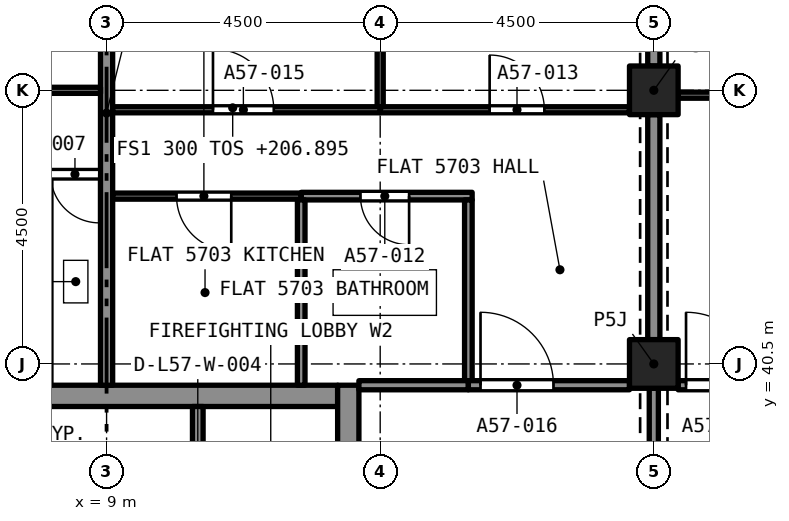
"""IFC4 building model, lengths in metres.
Left out: names, types, materials, properties, quantities, classifications, styles, units other than length and angle.
Written with IfcOpenShell. Run it as: python <this file> out.ifc"""

import sys

from ifc_helpers import new_model, si_unit, direction, frame, frame_2d, origin, origin_2d, place, context, subcontext, project, spatial, rectangle, extrude, element, fill, save


model = new_model("IFC4")
c1 = context("Model", 3, precision=1e-05, world=origin(), true_north=direction((0.0, 1.0)))
c2 = subcontext(c1, "Body", "Model", "MODEL_VIEW")
j1 = project(units=[si_unit("LENGTHUNIT", "METRE"), si_unit("PLANEANGLEUNIT", "RADIAN")], contexts=[c1])
p1 = place(None, origin())
s1 = spatial("IfcSite", under=j1, at=p1, CompositionType="ELEMENT")
p2 = place(p1, origin())
s2 = spatial("IfcBuilding", under=s1, at=p2, CompositionType="ELEMENT")
p3 = place(p2, frame((0.0, 0.0, 206.895)))
s3 = spatial("IfcBuildingStorey", under=s2, at=p3, CompositionType="ELEMENT", Elevation=206.895)
for number, where, z_axis, x_axis in (
    (1, (18.0, 40.5, 0.0), (0.0, 0.0, 1.0), (1.0, 0.0, 0.0)),
    (2, (18.0, 45.0, 0.0), (0.0, 0.0, 1.0), (1.0, 0.0, 0.0)),
):
    element("IfcColumn", number, at=place(p3, frame(where, z_axis=z_axis, x_axis=x_axis)), inside=s3, PredefinedType="COLUMN", context=c2, shape_type="SweptSolid", body=[
        extrude(rectangle(XDim=0.8, YDim=0.8, at=origin_2d()), origin(), (0.0, 0.0, 1.0), 3.2),
    ])
p4 = place(p3, frame((5.2, 39.975, 0.0), z_axis=(0.0, 0.0, 1.0), x_axis=(1.0, 0.0, 0.0)))
e3 = element("IfcWall", 3, at=p4, inside=s3, PredefinedType="SOLIDWALL", context=c2, shape_type="SweptSolid", body=[
    extrude(rectangle(XDim=7.6, YDim=0.35, at=frame_2d((3.8, 0.0))), origin(), (0.0, 0.0, 1.0), 3.2),
])
p5 = place(p3, frame((12.975, 27.35, 0.0), z_axis=(0.0, 0.0, 1.0), x_axis=(0.0, 1.0, 0.0)))
e4 = element("IfcWall", 4, at=p5, inside=s3, PredefinedType="SOLIDWALL", context=c2, shape_type="SweptSolid", body=[
    extrude(rectangle(XDim=12.8, YDim=0.35, at=frame_2d((6.4, 0.0))), origin(), (0.0, 0.0, 1.0), 3.2),
])
p6 = place(p5, frame((10.75, 0.0, 0.0)))
e5 = element("IfcOpeningElement", 5, at=p6, cuts=e4, PredefinedType="OPENING", context=c2, shape_type="SweptSolid", body=[
    extrude(rectangle(XDim=1.1, YDim=2.1, at=frame_2d((0.55, 1.05))), frame((0.0, 0.185, 0.0), z_axis=(0.0, -1.0, 0.0), x_axis=(1.0, 0.0, 0.0)), (0.0, 0.0, 1.0), 0.37),
])
p7 = place(p5, frame((8.6, 0.0, 0.0)))
e6 = element("IfcOpeningElement", 6, at=p7, cuts=e4, PredefinedType="OPENING", context=c2, shape_type="SweptSolid", body=[
    extrude(rectangle(XDim=1.2, YDim=2.1, at=frame_2d((0.6, 1.05))), frame((0.0, 0.185, 0.0), z_axis=(0.0, -1.0, 0.0), x_axis=(1.0, 0.0, 0.0)), (0.0, 0.0, 1.0), 0.37),
])
p8 = place(p3, frame((8.9, 43.62, 0.0), z_axis=(0.0, 0.0, 1.0), x_axis=(-1.0, 0.0, 0.0)))
e7 = element("IfcWall", 7, at=p8, inside=s3, PredefinedType="PARTITIONING", context=c2, shape_type="SweptSolid", body=[
    extrude(rectangle(XDim=0.877, YDim=0.125, at=frame_2d((0.438, 0.0))), origin(), (0.0, 0.0, 1.0), 2.9),
])
p9 = place(p8, frame((0.02, 0.0, 0.0)))
e8 = element("IfcOpeningElement", 8, at=p9, cuts=e7, PredefinedType="OPENING", context=c2, shape_type="SweptSolid", body=[
    extrude(rectangle(XDim=0.8, YDim=2.1, at=frame_2d((0.4, 1.05))), frame((0.0, 0.073, 0.0), z_axis=(0.0, -1.0, 0.0), x_axis=(1.0, 0.0, 0.0)), (0.0, 0.0, 1.0), 0.145),
])
p10 = place(p3, frame((9.0, 40.15, 0.0), z_axis=(0.0, 0.0, 1.0), x_axis=(0.0, 1.0, 0.0)))
e9 = element("IfcWall", 9, at=p10, inside=s3, PredefinedType="PARTITIONING", context=c2, shape_type="SweptSolid", body=[
    extrude(rectangle(XDim=8.95, YDim=0.2, at=frame_2d((4.475, 0.0))), origin(), (0.0, 0.0, 1.0), 2.9),
])
p11 = place(p3, frame((4.5, 45.0, 0.0), z_axis=(0.0, 0.0, 1.0), x_axis=(1.0, 0.0, 0.0)))
e10 = element("IfcWall", 10, at=p11, inside=s3, PredefinedType="PARTITIONING", context=c2, shape_type="SweptSolid", body=[
    extrude(rectangle(XDim=4.4, YDim=0.1, at=frame_2d((2.2, 0.0))), origin(), (0.0, 0.0, 1.0), 2.9),
])
p12 = place(p11, frame((1.8, 0.0, 0.0)))
e11 = element("IfcOpeningElement", 11, at=p12, cuts=e10, PredefinedType="OPENING", context=c2, shape_type="SweptSolid", body=[
    extrude(rectangle(XDim=0.9, YDim=2.1, at=frame_2d((0.45, 1.05))), frame((0.0, 0.06, 0.0), z_axis=(0.0, -1.0, 0.0), x_axis=(1.0, 0.0, 0.0)), (0.0, 0.0, 1.0), 0.12),
])
p13 = place(p3, frame((15.012, 43.26, 0.0), z_axis=(0.0, 0.0, 1.0), x_axis=(-1.0, 0.0, 0.0)))
e12 = element("IfcWall", 12, at=p13, inside=s3, PredefinedType="PARTITIONING", context=c2, shape_type="SweptSolid", body=[
    extrude(rectangle(XDim=2.812, YDim=0.125, at=frame_2d((1.406, 0.0))), origin(), (0.0, 0.0, 1.0), 2.9),
])
p14 = place(p13, frame((1.037, 0.0, 0.0)))
e13 = element("IfcOpeningElement", 13, at=p14, cuts=e12, PredefinedType="OPENING", context=c2, shape_type="SweptSolid", body=[
    extrude(rectangle(XDim=0.8, YDim=2.1, at=frame_2d((0.4, 1.05))), frame((0.0, 0.073, 0.0), z_axis=(0.0, -1.0, 0.0), x_axis=(1.0, 0.0, 0.0)), (0.0, 0.0, 1.0), 0.145),
])
p15 = place(p3, frame((14.95, 40.225, 0.0), z_axis=(0.0, 0.0, 1.0), x_axis=(0.0, 1.0, 0.0)))
e14 = element("IfcWall", 14, at=p15, inside=s3, PredefinedType="PARTITIONING", context=c2, shape_type="SweptSolid", body=[
    extrude(rectangle(XDim=2.972, YDim=0.125, at=frame_2d((1.486, 0.0))), origin(), (0.0, 0.0, 1.0), 2.9),
])
p16 = place(p3, frame((12.201, 40.15, 0.0), z_axis=(0.0, 0.0, 1.0), x_axis=(0.0, 1.0, 0.0)))
e15 = element("IfcWall", 15, at=p16, inside=s3, PredefinedType="PARTITIONING", context=c2, shape_type="SweptSolid", body=[
    extrude(rectangle(XDim=3.048, YDim=0.125, at=frame_2d((1.524, 0.0))), origin(), (0.0, 0.0, 1.0), 2.9),
])
p17 = place(p3, frame((13.15, 40.15, 0.0), z_axis=(0.0, 0.0, 1.0), x_axis=(1.0, 0.0, 0.0)))
e16 = element("IfcWall", 16, at=p17, inside=s3, PredefinedType="PARTITIONING", context=c2, shape_type="SweptSolid", body=[
    extrude(rectangle(XDim=1.8, YDim=0.15, at=frame_2d((0.9, 0.0))), origin(), (0.0, 0.0, 1.0), 2.9),
])
p18 = place(p3, frame((13.5, 44.68, 0.0), z_axis=(0.0, 0.0, 1.0), x_axis=(1.0, 0.0, 0.0)))
e17 = element("IfcWall", 17, at=p18, inside=s3, PredefinedType="PARTITIONING", context=c2, shape_type="SweptSolid", body=[
    extrude(rectangle(XDim=4.1, YDim=0.1, at=frame_2d((2.05, 0.0))), origin(), (0.0, 0.0, 1.0), 2.9),
])
p19 = place(p18, frame((1.8, 0.0, 0.0)))
e18 = element("IfcOpeningElement", 18, at=p19, cuts=e17, PredefinedType="OPENING", context=c2, shape_type="SweptSolid", body=[
    extrude(rectangle(XDim=0.9, YDim=2.1, at=frame_2d((0.45, 1.05))), frame((0.0, 0.06, 0.0), z_axis=(0.0, -1.0, 0.0), x_axis=(1.0, 0.0, 0.0)), (0.0, 0.0, 1.0), 0.12),
])
p20 = place(p3, frame((13.5, 44.73, 0.0), z_axis=(0.0, 0.0, 1.0), x_axis=(0.0, 1.0, 0.0)))
e19 = element("IfcWall", 19, at=p20, inside=s3, PredefinedType="PARTITIONING", context=c2, shape_type="SweptSolid", body=[
    extrude(rectangle(XDim=4.37, YDim=0.1, at=frame_2d((2.185, 0.0))), origin(), (0.0, 0.0, 1.0), 2.9),
])
p21 = place(p3, frame((18.0, 45.4, 0.0), z_axis=(0.0, 0.0, 1.0), x_axis=(0.0, 1.0, 0.0)))
e20 = element("IfcWall", 20, at=p21, inside=s3, PredefinedType="PARTITIONING", context=c2, shape_type="SweptSolid", body=[
    extrude(rectangle(XDim=3.7, YDim=0.2, at=frame_2d((1.85, 0.0))), origin(), (0.0, 0.0, 1.0), 2.38),
])
p22 = place(p3, frame((12.201, 43.26, 0.0), z_axis=(0.0, 0.0, 1.0), x_axis=(-1.0, 0.0, 0.0)))
e21 = element("IfcWall", 21, at=p22, inside=s3, PredefinedType="PARTITIONING", context=c2, shape_type="SweptSolid", body=[
    extrude(rectangle(XDim=3.101, YDim=0.1, at=frame_2d((1.55, 0.0))), origin(), (0.0, 0.0, 1.0), 2.9),
])
p23 = place(p22, frame((1.15, 0.0, 0.0)))
e22 = element("IfcOpeningElement", 22, at=p23, cuts=e21, PredefinedType="OPENING", context=c2, shape_type="SweptSolid", body=[
    extrude(rectangle(XDim=0.9, YDim=2.1, at=frame_2d((0.45, 1.05))), frame((0.0, 0.06, 0.0), z_axis=(0.0, -1.0, 0.0), x_axis=(1.0, 0.0, 0.0)), (0.0, 0.0, 1.0), 0.12),
])
p24 = place(p3, frame((9.1, 44.68, 0.0), z_axis=(0.0, 0.0, 1.0), x_axis=(1.0, 0.0, 0.0)))
e23 = element("IfcWall", 23, at=p24, inside=s3, PredefinedType="PARTITIONING", context=c2, shape_type="SweptSolid", body=[
    extrude(rectangle(XDim=4.4, YDim=0.1, at=frame_2d((2.2, 0.0))), origin(), (0.0, 0.0, 1.0), 2.9),
])
p25 = place(p24, frame((1.65, 0.0, 0.0)))
e24 = element("IfcOpeningElement", 24, at=p25, cuts=e23, PredefinedType="OPENING", context=c2, shape_type="SweptSolid", body=[
    extrude(rectangle(XDim=1.0, YDim=2.1, at=frame_2d((0.5, 1.05))), frame((0.0, 0.06, 0.0), z_axis=(0.0, -1.0, 0.0), x_axis=(1.0, 0.0, 0.0)), (0.0, 0.0, 1.0), 0.12),
])
p26 = place(p3, frame((18.0, 40.9, 0.0), z_axis=(0.0, 0.0, 1.0), x_axis=(0.0, 1.0, 0.0)))
e25 = element("IfcWall", 25, at=p26, inside=s3, PredefinedType="PARTITIONING", context=c2, shape_type="SweptSolid", body=[
    extrude(rectangle(XDim=3.7, YDim=0.2, at=frame_2d((1.85, 0.0))), origin(), (0.0, 0.0, 1.0), 2.38),
])
p27 = place(p3, frame((14.95, 40.15, 0.0), z_axis=(0.0, 0.0, 1.0), x_axis=(1.0, 0.0, 0.0)))
e26 = element("IfcWall", 26, at=p27, inside=s3, PredefinedType="PARTITIONING", context=c2, shape_type="SweptSolid", body=[
    extrude(rectangle(XDim=2.65, YDim=0.15, at=frame_2d((1.325, 0.0))), origin(), (0.0, 0.0, 1.0), 2.9),
])
p28 = place(p27, frame((0.2, 0.0, 0.0)))
e27 = element("IfcOpeningElement", 27, at=p28, cuts=e26, PredefinedType="OPENING", context=c2, shape_type="SweptSolid", body=[
    extrude(rectangle(XDim=1.2, YDim=2.4, at=frame_2d((0.6, 1.2))), frame((0.0, 0.085, 0.0), z_axis=(0.0, -1.0, 0.0), x_axis=(1.0, 0.0, 0.0)), (0.0, 0.0, 1.0), 0.17),
])
p29 = place(p3, frame((18.4, 44.92, 0.0), z_axis=(0.0, 0.0, 1.0), x_axis=(1.0, 0.0, 0.0)))
e28 = element("IfcWall", 28, at=p29, inside=s3, PredefinedType="PARTITIONING", context=c2, shape_type="SweptSolid", body=[
    extrude(rectangle(XDim=4.1, YDim=0.1, at=frame_2d((2.05, 0.0))), origin(), (0.0, 0.0, 1.0), 2.75),
])
p30 = place(p29, frame((1.4, 0.0, 0.0)))
e29 = element("IfcOpeningElement", 29, at=p30, cuts=e28, PredefinedType="OPENING", context=c2, shape_type="SweptSolid", body=[
    extrude(rectangle(XDim=0.9, YDim=2.1, at=frame_2d((0.45, 1.05))), frame((0.0, 0.06, 0.0), z_axis=(0.0, -1.0, 0.0), x_axis=(1.0, 0.0, 0.0)), (0.0, 0.0, 1.0), 0.12),
])
p31 = place(p3, frame((18.4, 40.15, 0.0), z_axis=(0.0, 0.0, 1.0), x_axis=(1.0, 0.0, 0.0)))
e30 = element("IfcWall", 30, at=p31, inside=s3, PredefinedType="PARTITIONING", context=c2, shape_type="SweptSolid", body=[
    extrude(rectangle(XDim=1.95, YDim=0.15, at=frame_2d((0.975, 0.0))), origin(), (0.0, 0.0, 1.0), 2.75),
])
p32 = place(p31, frame((0.13, 0.0, 0.0)))
e31 = element("IfcOpeningElement", 31, at=p32, cuts=e30, PredefinedType="OPENING", context=c2, shape_type="SweptSolid", body=[
    extrude(rectangle(XDim=1.2, YDim=2.4, at=frame_2d((0.6, 1.2))), frame((0.0, 0.085, 0.0), z_axis=(0.0, -1.0, 0.0), x_axis=(1.0, 0.0, 0.0)), (0.0, 0.0, 1.0), 0.17),
])
p33 = place(p3, frame((18.0, 40.1, 0.0), z_axis=(0.0, 0.0, 1.0), x_axis=(0.0, -1.0, 0.0)))
e32 = element("IfcWall", 32, at=p33, inside=s3, PredefinedType="PARTITIONING", context=c2, shape_type="SweptSolid", body=[
    extrude(rectangle(XDim=3.7, YDim=0.15, at=frame_2d((1.85, 0.0))), origin(), (0.0, 0.0, 1.0), 2.38),
])
p34 = place(p33, frame((1.25, 0.0, 0.0)))
e33 = element("IfcOpeningElement", 33, at=p34, cuts=e32, PredefinedType="OPENING", context=c2, shape_type="SweptSolid", body=[
    extrude(rectangle(XDim=1.2, YDim=2.1, at=frame_2d((0.6, 1.05))), frame((0.0, 0.085, 0.0), z_axis=(0.0, -1.0, 0.0), x_axis=(1.0, 0.0, 0.0)), (0.0, 0.0, 1.0), 0.17),
])
p35 = place(p3, frame((10.5, 37.5, 0.0), z_axis=(0.0, 0.0, 1.0), x_axis=(0.0, 1.0, 0.0)))
e34 = element("IfcWall", 34, at=p35, inside=s3, PredefinedType="SOLIDWALL", context=c2, shape_type="SweptSolid", body=[
    extrude(rectangle(XDim=2.3, YDim=0.175, at=frame_2d((1.15, 0.0))), origin(), (0.0, 0.0, 1.0), 2.9),
])
p36 = place(p35, frame((0.65, 0.0, 0.0)))
e35 = element("IfcOpeningElement", 35, at=p36, cuts=e34, PredefinedType="OPENING", context=c2, shape_type="SweptSolid", body=[
    extrude(rectangle(XDim=1.0, YDim=2.1, at=frame_2d((0.5, 1.05))), frame((0.0, 0.097, 0.0), z_axis=(0.0, -1.0, 0.0), x_axis=(1.0, 0.0, 0.0)), (0.0, 0.0, 1.0), 0.195),
])
p37 = place(p9, origin())
e36 = element("IfcDoor", 36, at=p37, inside=s3, OperationType="SINGLE_SWING_LEFT", PredefinedType="DOOR", context=c2, shape_type="SweptSolid", body=[
    extrude(rectangle(XDim=0.8, YDim=2.1, at=frame_2d((0.4, 1.05))), frame((0.0, 0.025, 0.0), z_axis=(0.0, -1.0, 0.0), x_axis=(1.0, 0.0, 0.0)), (0.0, 0.0, 1.0), 0.05),
])
fill(e8, e36)
p38 = place(p14, origin())
e37 = element("IfcDoor", 37, at=p38, inside=s3, OperationType="SINGLE_SWING_RIGHT", PredefinedType="DOOR", context=c2, shape_type="SweptSolid", body=[
    extrude(rectangle(XDim=0.8, YDim=2.1, at=frame_2d((0.4, 1.05))), frame((0.0, 0.025, 0.0), z_axis=(0.0, -1.0, 0.0), x_axis=(1.0, 0.0, 0.0)), (0.0, 0.0, 1.0), 0.05),
])
fill(e13, e37)
p39 = place(p19, origin())
e38 = element("IfcDoor", 38, at=p39, inside=s3, OperationType="SINGLE_SWING_RIGHT", PredefinedType="DOOR", context=c2, shape_type="SweptSolid", body=[
    extrude(rectangle(XDim=0.9, YDim=2.1, at=frame_2d((0.45, 1.05))), frame((0.0, 0.025, 0.0), z_axis=(0.0, -1.0, 0.0), x_axis=(1.0, 0.0, 0.0)), (0.0, 0.0, 1.0), 0.05),
])
fill(e18, e38)
p40 = place(p23, origin())
e39 = element("IfcDoor", 39, at=p40, inside=s3, OperationType="SINGLE_SWING_RIGHT", PredefinedType="DOOR", context=c2, shape_type="SweptSolid", body=[
    extrude(rectangle(XDim=0.9, YDim=2.1, at=frame_2d((0.45, 1.05))), frame((0.0, 0.025, 0.0), z_axis=(0.0, -1.0, 0.0), x_axis=(1.0, 0.0, 0.0)), (0.0, 0.0, 1.0), 0.05),
])
fill(e22, e39)
p41 = place(p25, origin())
e40 = element("IfcDoor", 40, at=p41, inside=s3, OperationType="SINGLE_SWING_LEFT", PredefinedType="DOOR", context=c2, shape_type="SweptSolid", body=[
    extrude(rectangle(XDim=1.0, YDim=2.1, at=frame_2d((0.5, 1.05))), frame((0.0, 0.025, 0.0), z_axis=(0.0, -1.0, 0.0), x_axis=(1.0, 0.0, 0.0)), (0.0, 0.0, 1.0), 0.05),
])
fill(e24, e40)
p42 = place(p28, origin())
e41 = element("IfcDoor", 41, at=p42, inside=s3, OperationType="SINGLE_SWING_LEFT", PredefinedType="DOOR", context=c2, shape_type="SweptSolid", body=[
    extrude(rectangle(XDim=1.2, YDim=2.4, at=frame_2d((0.6, 1.2))), frame((0.0, 0.025, 0.0), z_axis=(0.0, -1.0, 0.0), x_axis=(1.0, 0.0, 0.0)), (0.0, 0.0, 1.0), 0.05),
])
fill(e27, e41)
p43 = place(p32, origin())
e42 = element("IfcDoor", 42, at=p43, inside=s3, OperationType="SINGLE_SWING_LEFT", PredefinedType="DOOR", context=c2, shape_type="SweptSolid", body=[
    extrude(rectangle(XDim=1.2, YDim=2.4, at=frame_2d((0.6, 1.2))), frame((0.0, 0.025, 0.0), z_axis=(0.0, -1.0, 0.0), x_axis=(1.0, 0.0, 0.0)), (0.0, 0.0, 1.0), 0.05),
])
fill(e31, e42)
save(model, sys.argv[1])
